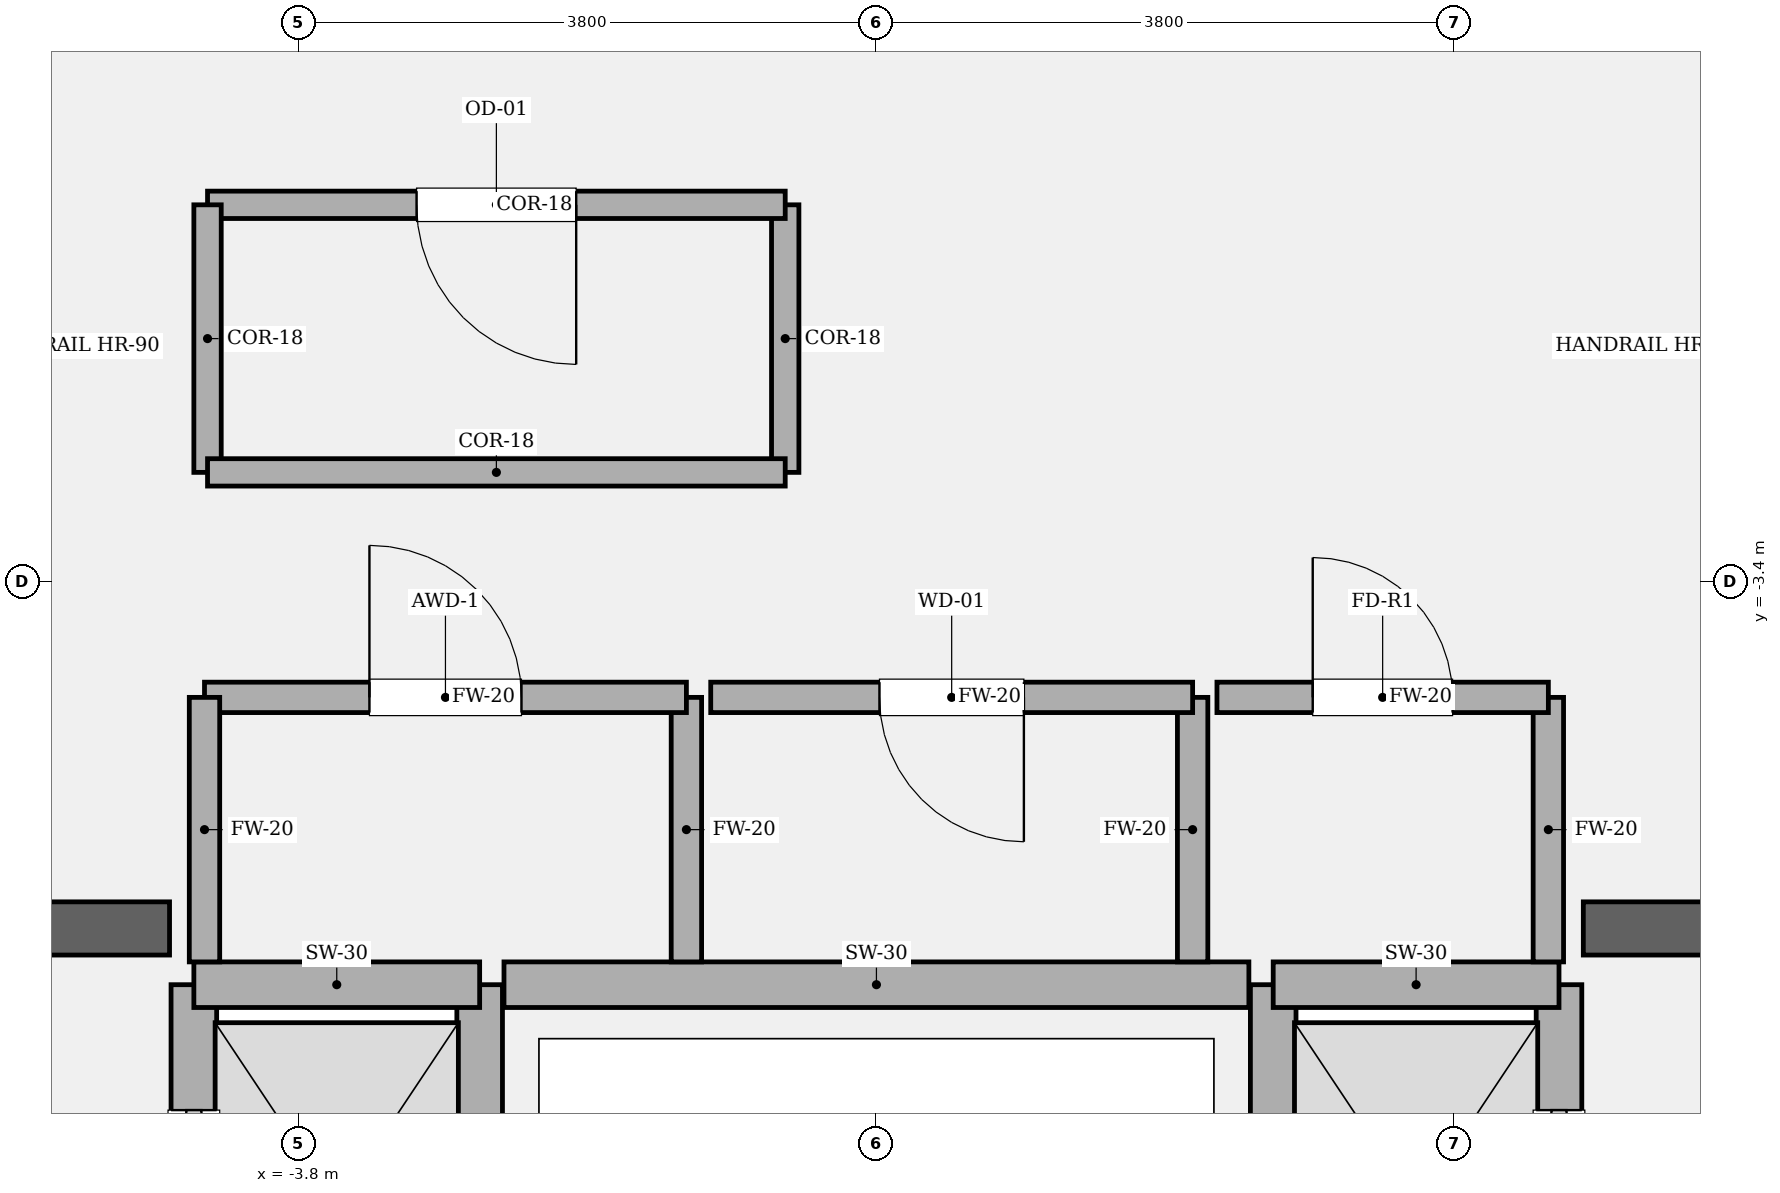
"""IFC4 building model, lengths in metres.
Left out: names, types, materials, properties, quantities, classifications, styles, units other than length and angle.
Written with IfcOpenShell. Run it as: python <this file> out.ifc"""

import sys

from ifc_helpers import new_model, si_unit, direction, frame, frame_2d, origin, place, context, subcontext, project, spatial, rectangle, extrude, element, fill, save


model = new_model("IFC4")
c1 = context("Model", 3, precision=1e-05, world=origin(), true_north=direction((0.0, 1.0)))
c2 = subcontext(c1, "Body", "Model", "MODEL_VIEW")
j1 = project(units=[si_unit("LENGTHUNIT", "METRE"), si_unit("PLANEANGLEUNIT", "RADIAN")], contexts=[c1])
p1 = place(None, origin())
s1 = spatial("IfcSite", under=j1, at=p1, CompositionType="ELEMENT")
p2 = place(p1, origin())
s2 = spatial("IfcBuilding", under=s1, at=p2, CompositionType="ELEMENT")
p3 = place(p2, frame((0.0, 0.0, 176.25)))
s3 = spatial("IfcBuildingStorey", under=s2, at=p3, CompositionType="ELEMENT", Elevation=176.25)
p4 = place(p3, frame((-9.875, -5.68, 0.0), z_axis=(0.0, 0.0, 1.0), x_axis=(1.0, 0.0, 0.0)))
e1 = element("IfcWall", 1, at=p4, inside=s3, PredefinedType="SOLIDWALL", context=c2, shape_type="SweptSolid", body=[
    extrude(rectangle(XDim=5.225, YDim=0.35, at=frame_2d((2.613, 0.0))), origin(), (0.0, 0.0, 1.0), 4.05),
])
p5 = place(p4, frame((1.335, 0.0, 0.0)))
e2 = element("IfcOpeningElement", 2, at=p5, cuts=e1, PredefinedType="OPENING", context=c2, shape_type="SweptSolid", body=[
    extrude(rectangle(XDim=1.18, YDim=2.2, at=frame_2d((0.59, 1.1))), frame((0.0, 0.185, 0.0), z_axis=(0.0, -1.0, 0.0), x_axis=(1.0, 0.0, 0.0)), (0.0, 0.0, 1.0), 0.37),
])
p6 = place(p3, frame((4.65, -5.68, 0.0), z_axis=(0.0, 0.0, 1.0), x_axis=(1.0, 0.0, 0.0)))
e3 = element("IfcWall", 3, at=p6, inside=s3, PredefinedType="SOLIDWALL", context=c2, shape_type="SweptSolid", body=[
    extrude(rectangle(XDim=5.225, YDim=0.35, at=frame_2d((2.613, 0.0))), origin(), (0.0, 0.0, 1.0), 4.05),
])
p7 = place(p6, frame((2.71, 0.0, 0.0)))
e4 = element("IfcOpeningElement", 4, at=p7, cuts=e3, PredefinedType="OPENING", context=c2, shape_type="SweptSolid", body=[
    extrude(rectangle(XDim=1.18, YDim=2.2, at=frame_2d((0.59, 1.1))), frame((0.0, 0.185, 0.0), z_axis=(0.0, -1.0, 0.0), x_axis=(1.0, 0.0, 0.0)), (0.0, 0.0, 1.0), 0.37),
])
p8 = place(p3, frame((-4.49, -8.82, 0.0), z_axis=(0.0, 0.0, 1.0), x_axis=(0.0, 1.0, 0.0)))
e5 = element("IfcWall", 5, at=p8, inside=s3, PredefinedType="SOLIDWALL", context=c2, shape_type="SweptSolid", body=[
    extrude(rectangle(XDim=2.77, YDim=0.3, at=frame_2d((1.385, 0.0))), origin(), (0.0, 0.0, 1.0), 3.83),
])
p9 = place(p8, frame((0.825, 0.0, 0.0)))
e6 = element("IfcOpeningElement", 6, at=p9, cuts=e5, PredefinedType="OPENING", context=c2, shape_type="SweptSolid", body=[
    extrude(rectangle(XDim=1.12, YDim=2.25, at=frame_2d((0.56, 1.125))), frame((0.0, 0.16, 0.0), z_axis=(0.0, -1.0, 0.0), x_axis=(1.0, 0.0, 0.0)), (0.0, 0.0, 1.0), 0.32),
])
p10 = place(p3, frame((-2.61, -8.82, 0.0), z_axis=(0.0, 0.0, 1.0), x_axis=(0.0, 1.0, 0.0)))
e7 = element("IfcWall", 7, at=p10, inside=s3, PredefinedType="SOLIDWALL", context=c2, shape_type="SweptSolid", body=[
    extrude(rectangle(XDim=2.77, YDim=0.3, at=frame_2d((1.385, 0.0))), origin(), (0.0, 0.0, 1.0), 3.83),
])
p11 = place(p3, frame((-4.49, -6.05, 0.0), z_axis=(0.0, 0.0, 1.0), x_axis=(1.0, 0.0, 0.0)))
e8 = element("IfcWall", 8, at=p11, inside=s3, PredefinedType="SOLIDWALL", context=c2, shape_type="SweptSolid", body=[
    extrude(rectangle(XDim=1.88, YDim=0.3, at=frame_2d((0.94, 0.0))), origin(), (0.0, 0.0, 1.0), 3.83),
])
p12 = place(p3, frame((4.49, -8.82, 0.0), z_axis=(0.0, 0.0, 1.0), x_axis=(0.0, 1.0, 0.0)))
e9 = element("IfcWall", 9, at=p12, inside=s3, PredefinedType="SOLIDWALL", context=c2, shape_type="SweptSolid", body=[
    extrude(rectangle(XDim=2.77, YDim=0.3, at=frame_2d((1.385, 0.0))), origin(), (0.0, 0.0, 1.0), 3.83),
])
p13 = place(p12, frame((0.825, 0.0, 0.0)))
e10 = element("IfcOpeningElement", 10, at=p13, cuts=e9, PredefinedType="OPENING", context=c2, shape_type="SweptSolid", body=[
    extrude(rectangle(XDim=1.12, YDim=2.25, at=frame_2d((0.56, 1.125))), frame((0.0, 0.16, 0.0), z_axis=(0.0, -1.0, 0.0), x_axis=(1.0, 0.0, 0.0)), (0.0, 0.0, 1.0), 0.32),
])
p14 = place(p3, frame((2.61, -8.82, 0.0), z_axis=(0.0, 0.0, 1.0), x_axis=(0.0, 1.0, 0.0)))
e11 = element("IfcWall", 11, at=p14, inside=s3, PredefinedType="SOLIDWALL", context=c2, shape_type="SweptSolid", body=[
    extrude(rectangle(XDim=2.77, YDim=0.3, at=frame_2d((1.385, 0.0))), origin(), (0.0, 0.0, 1.0), 3.83),
])
p15 = place(p3, frame((2.61, -6.05, 0.0), z_axis=(0.0, 0.0, 1.0), x_axis=(1.0, 0.0, 0.0)))
e12 = element("IfcWall", 12, at=p15, inside=s3, PredefinedType="SOLIDWALL", context=c2, shape_type="SweptSolid", body=[
    extrude(rectangle(XDim=1.88, YDim=0.3, at=frame_2d((0.94, 0.0))), origin(), (0.0, 0.0, 1.0), 3.83),
])
p16 = place(p3, frame((-2.45, -6.05, 0.0), z_axis=(0.0, 0.0, 1.0), x_axis=(1.0, 0.0, 0.0)))
e13 = element("IfcWall", 13, at=p16, inside=s3, PredefinedType="SOLIDWALL", context=c2, shape_type="SweptSolid", body=[
    extrude(rectangle(XDim=4.9, YDim=0.3, at=frame_2d((2.45, 0.0))), origin(), (0.0, 0.0, 1.0), 3.83),
])
p17 = place(p3, frame((-1.25, -5.9, 0.0), z_axis=(0.0, 0.0, 1.0), x_axis=(0.0, 1.0, 0.0)))
e14 = element("IfcWall", 14, at=p17, inside=s3, PredefinedType="SOLIDWALL", context=c2, shape_type="SweptSolid", body=[
    extrude(rectangle(XDim=1.74, YDim=0.2, at=frame_2d((0.87, 0.0))), origin(), (0.0, 0.0, 1.0), 3.83),
])
p18 = place(p3, frame((-1.25, -4.16, 0.0), z_axis=(0.0, 0.0, 1.0), x_axis=(-1.0, 0.0, 0.0)))
e15 = element("IfcWall", 15, at=p18, inside=s3, PredefinedType="SOLIDWALL", context=c2, shape_type="SweptSolid", body=[
    extrude(rectangle(XDim=3.17, YDim=0.2, at=frame_2d((1.585, 0.0))), origin(), (0.0, 0.0, 1.0), 3.83),
])
p19 = place(p18, frame((1.085, 0.0, 0.0)))
e16 = element("IfcOpeningElement", 16, at=p19, cuts=e15, PredefinedType="OPENING", context=c2, shape_type="SweptSolid", body=[
    extrude(rectangle(XDim=1.0, YDim=2.15, at=frame_2d((0.5, 1.075))), frame((0.0, 0.11, 0.0), z_axis=(0.0, -1.0, 0.0), x_axis=(1.0, 0.0, 0.0)), (0.0, 0.0, 1.0), 0.22),
])
for number, where, z_axis, x_axis in (
    (17, (-4.42, -4.16, 0.0), (0.0, 0.0, 1.0), (0.0, -1.0, 0.0)),
    (18, (2.08, -5.9, 0.0), (0.0, 0.0, 1.0), (0.0, 1.0, 0.0)),
):
    element("IfcWall", number, at=place(p3, frame(where, z_axis=z_axis, x_axis=x_axis)), inside=s3, PredefinedType="SOLIDWALL", context=c2, shape_type="SweptSolid", body=[
        extrude(rectangle(XDim=1.74, YDim=0.2, at=frame_2d((0.87, 0.0))), origin(), (0.0, 0.0, 1.0), 3.83),
    ])
p20 = place(p3, frame((2.08, -4.16, 0.0), z_axis=(0.0, 0.0, 1.0), x_axis=(-1.0, 0.0, 0.0)))
e19 = element("IfcWall", 19, at=p20, inside=s3, PredefinedType="SOLIDWALL", context=c2, shape_type="SweptSolid", body=[
    extrude(rectangle(XDim=3.17, YDim=0.2, at=frame_2d((1.585, 0.0))), origin(), (0.0, 0.0, 1.0), 3.83),
])
p21 = place(p20, frame((1.11, 0.0, 0.0)))
e20 = element("IfcOpeningElement", 20, at=p21, cuts=e19, PredefinedType="OPENING", context=c2, shape_type="SweptSolid", body=[
    extrude(rectangle(XDim=0.95, YDim=2.15, at=frame_2d((0.475, 1.075))), frame((0.0, 0.11, 0.0), z_axis=(0.0, -1.0, 0.0), x_axis=(1.0, 0.0, 0.0)), (0.0, 0.0, 1.0), 0.22),
])
p22 = place(p3, frame((4.42, -5.9, 0.0), z_axis=(0.0, 0.0, 1.0), x_axis=(0.0, 1.0, 0.0)))
e21 = element("IfcWall", 21, at=p22, inside=s3, PredefinedType="SOLIDWALL", context=c2, shape_type="SweptSolid", body=[
    extrude(rectangle(XDim=1.74, YDim=0.2, at=frame_2d((0.87, 0.0))), origin(), (0.0, 0.0, 1.0), 3.83),
])
p23 = place(p3, frame((4.42, -4.16, 0.0), z_axis=(0.0, 0.0, 1.0), x_axis=(-1.0, 0.0, 0.0)))
e22 = element("IfcWall", 22, at=p23, inside=s3, PredefinedType="SOLIDWALL", context=c2, shape_type="SweptSolid", body=[
    extrude(rectangle(XDim=2.18, YDim=0.2, at=frame_2d((1.09, 0.0))), origin(), (0.0, 0.0, 1.0), 3.83),
])
p24 = place(p23, frame((0.63, 0.0, 0.0)))
e23 = element("IfcOpeningElement", 23, at=p24, cuts=e22, PredefinedType="OPENING", context=c2, shape_type="SweptSolid", body=[
    extrude(rectangle(XDim=0.92, YDim=2.1, at=frame_2d((0.46, 1.05))), frame((0.0, 0.11, 0.0), z_axis=(0.0, -1.0, 0.0), x_axis=(1.0, 0.0, 0.0)), (0.0, 0.0, 1.0), 0.22),
])
p25 = place(p3, frame((-0.6, -2.68, 0.0), z_axis=(0.0, 0.0, 1.0), x_axis=(0.0, 1.0, 0.0)))
e24 = element("IfcWall", 24, at=p25, inside=s3, PredefinedType="PARTITIONING", context=c2, shape_type="SweptSolid", body=[
    extrude(rectangle(XDim=1.76, YDim=0.18, at=frame_2d((0.88, 0.0))), origin(), (0.0, 0.0, 1.0), 3.83),
])
p26 = place(p3, frame((-0.6, -0.92, 0.0), z_axis=(0.0, 0.0, 1.0), x_axis=(-1.0, 0.0, 0.0)))
e25 = element("IfcWall", 25, at=p26, inside=s3, PredefinedType="PARTITIONING", context=c2, shape_type="SweptSolid", body=[
    extrude(rectangle(XDim=3.8, YDim=0.18, at=frame_2d((1.9, 0.0))), origin(), (0.0, 0.0, 1.0), 3.83),
])
p27 = place(p26, frame((1.375, 0.0, 0.0)))
e26 = element("IfcOpeningElement", 26, at=p27, cuts=e25, PredefinedType="OPENING", context=c2, shape_type="SweptSolid", body=[
    extrude(rectangle(XDim=1.05, YDim=2.2, at=frame_2d((0.525, 1.1))), frame((0.0, 0.1, 0.0), z_axis=(0.0, -1.0, 0.0), x_axis=(1.0, 0.0, 0.0)), (0.0, 0.0, 1.0), 0.2),
])
p28 = place(p3, frame((-4.4, -0.92, 0.0), z_axis=(0.0, 0.0, 1.0), x_axis=(0.0, -1.0, 0.0)))
e27 = element("IfcWall", 27, at=p28, inside=s3, PredefinedType="PARTITIONING", context=c2, shape_type="SweptSolid", body=[
    extrude(rectangle(XDim=1.76, YDim=0.18, at=frame_2d((0.88, 0.0))), origin(), (0.0, 0.0, 1.0), 3.83),
])
p29 = place(p3, frame((-4.4, -2.68, 0.0), z_axis=(0.0, 0.0, 1.0), x_axis=(1.0, 0.0, 0.0)))
e28 = element("IfcWall", 28, at=p29, inside=s3, PredefinedType="PARTITIONING", context=c2, shape_type="SweptSolid", body=[
    extrude(rectangle(XDim=3.8, YDim=0.18, at=frame_2d((1.9, 0.0))), origin(), (0.0, 0.0, 1.0), 3.83),
])
p30 = place(p9, origin())
e29 = element("IfcDoor", 29, at=p30, inside=s3, OperationType="SLIDING_TO_LEFT", PredefinedType="DOOR", context=c2, shape_type="SweptSolid", body=[
    extrude(rectangle(XDim=1.12, YDim=2.25, at=frame_2d((0.56, 1.125))), frame((0.0, 0.025, 0.0), z_axis=(0.0, -1.0, 0.0), x_axis=(1.0, 0.0, 0.0)), (0.0, 0.0, 1.0), 0.05),
])
fill(e6, e29)
p31 = place(p13, origin())
e30 = element("IfcDoor", 30, at=p31, inside=s3, OperationType="SLIDING_TO_RIGHT", PredefinedType="DOOR", context=c2, shape_type="SweptSolid", body=[
    extrude(rectangle(XDim=1.12, YDim=2.25, at=frame_2d((0.56, 1.125))), frame((0.0, 0.025, 0.0), z_axis=(0.0, -1.0, 0.0), x_axis=(1.0, 0.0, 0.0)), (0.0, 0.0, 1.0), 0.05),
])
fill(e10, e30)
p32 = place(p19, origin())
e31 = element("IfcDoor", 31, at=p32, inside=s3, OperationType="SINGLE_SWING_RIGHT", PredefinedType="DOOR", context=c2, shape_type="SweptSolid", body=[
    extrude(rectangle(XDim=1.0, YDim=2.15, at=frame_2d((0.5, 1.075))), frame((0.0, 0.025, 0.0), z_axis=(0.0, -1.0, 0.0), x_axis=(1.0, 0.0, 0.0)), (0.0, 0.0, 1.0), 0.05),
])
fill(e16, e31)
p33 = place(p21, origin())
e32 = element("IfcDoor", 32, at=p33, inside=s3, OperationType="SINGLE_SWING_LEFT", PredefinedType="DOOR", context=c2, shape_type="SweptSolid", body=[
    extrude(rectangle(XDim=0.95, YDim=2.15, at=frame_2d((0.475, 1.075))), frame((0.0, 0.025, 0.0), z_axis=(0.0, -1.0, 0.0), x_axis=(1.0, 0.0, 0.0)), (0.0, 0.0, 1.0), 0.05),
])
fill(e20, e32)
p34 = place(p24, origin())
e33 = element("IfcDoor", 33, at=p34, inside=s3, OperationType="SINGLE_SWING_RIGHT", PredefinedType="DOOR", context=c2, shape_type="SweptSolid", body=[
    extrude(rectangle(XDim=0.92, YDim=2.1, at=frame_2d((0.46, 1.05))), frame((0.0, 0.025, 0.0), z_axis=(0.0, -1.0, 0.0), x_axis=(1.0, 0.0, 0.0)), (0.0, 0.0, 1.0), 0.05),
])
fill(e23, e33)
p35 = place(p27, origin())
e34 = element("IfcDoor", 34, at=p35, inside=s3, OperationType="SINGLE_SWING_LEFT", PredefinedType="DOOR", context=c2, shape_type="SweptSolid", body=[
    extrude(rectangle(XDim=1.05, YDim=2.2, at=frame_2d((0.525, 1.1))), frame((0.0, 0.025, 0.0), z_axis=(0.0, -1.0, 0.0), x_axis=(1.0, 0.0, 0.0)), (0.0, 0.0, 1.0), 0.05),
])
fill(e26, e34)
save(model, sys.argv[1])
